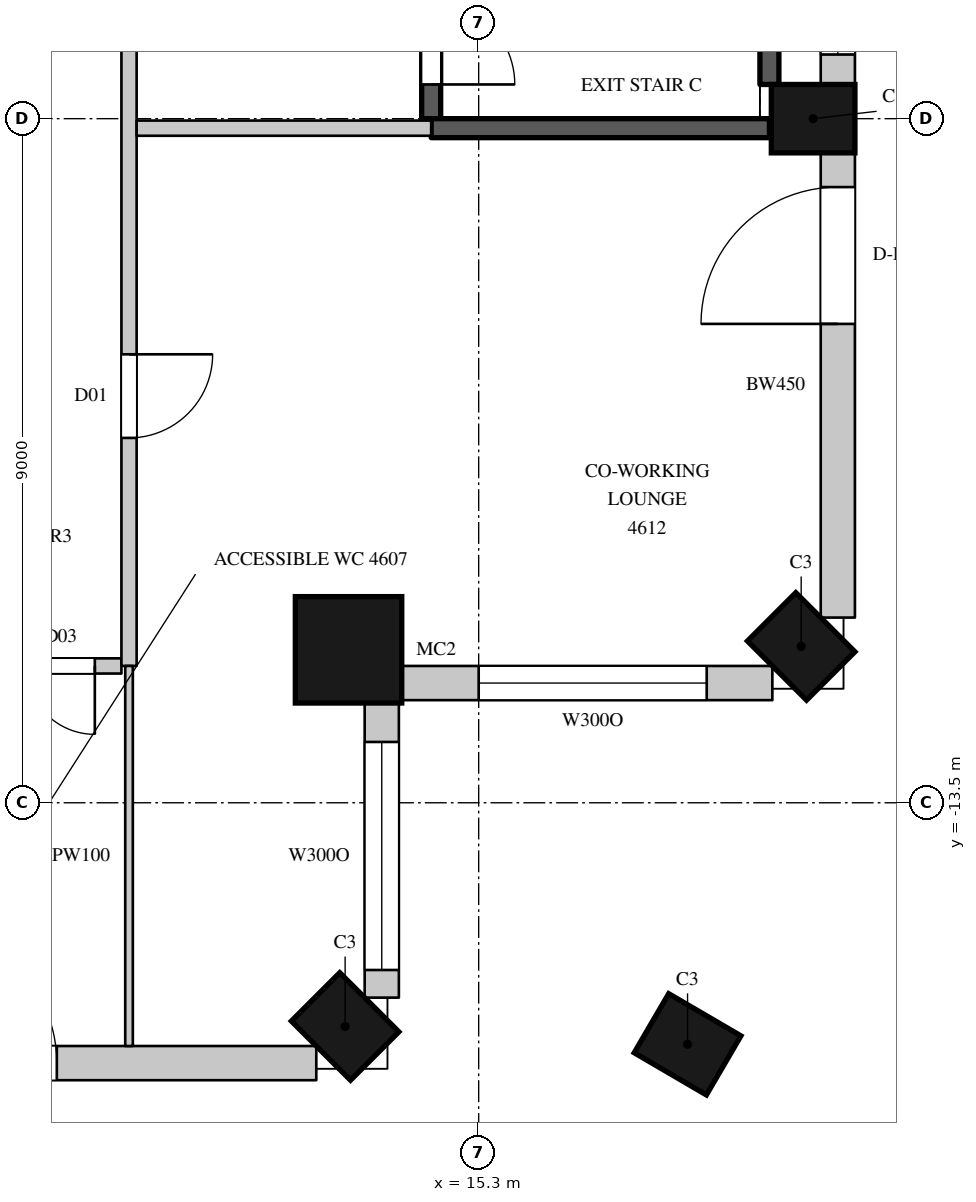
"""IFC4 building model, lengths in metres.
Left out: names, types, materials, properties, quantities, classifications, styles, units other than length and angle.
Written with IfcOpenShell. Run it as: python <this file> out.ifc"""

import sys

from ifc_helpers import new_model, si_unit, direction, frame, frame_2d, origin, origin_2d, place, context, subcontext, project, spatial, rectangle, circle, extrude, element, fill, save


model = new_model("IFC4")
c1 = context("Model", 3, precision=1e-05, world=origin(), true_north=direction((0.0, 1.0)))
c2 = subcontext(c1, "Body", "Model", "MODEL_VIEW")
j1 = project(units=[si_unit("LENGTHUNIT", "METRE"), si_unit("PLANEANGLEUNIT", "RADIAN")], contexts=[c1])
p1 = place(None, origin())
s1 = spatial("IfcSite", under=j1, at=p1, CompositionType="ELEMENT")
p2 = place(p1, origin())
s2 = spatial("IfcBuilding", under=s1, at=p2, CompositionType="ELEMENT")
p3 = place(p2, frame((0.0, 0.0, 209.7)))
s3 = spatial("IfcBuildingStorey", under=s2, at=p3, CompositionType="ELEMENT", Elevation=209.7)
p4 = place(p3, frame((13.543, -16.443, 0.0), z_axis=(0.0, 0.0, 1.0), x_axis=(0.707106781187, 0.707106781187, 0.0)))
e1 = element("IfcColumn", 1, at=p4, inside=s3, PredefinedType="COLUMN", context=c2, shape_type="SweptSolid", body=[
    extrude(rectangle(XDim=0.9, YDim=1.1, at=origin_2d()), origin(), (0.0, 0.0, 1.0), 4.1),
])
p5 = place(p3, frame((13.588, -11.488, 0.0), z_axis=(0.0, 0.0, 1.0), x_axis=(1.0, 0.0, 0.0)))
e2 = element("IfcColumn", 2, at=p5, inside=s3, PredefinedType="COLUMN", context=c2, shape_type="SweptSolid", body=[
    extrude(circle(Radius=0.7, at=origin_2d()), origin(), (0.0, 0.0, 1.0), 4.1),
])
for number, where, z_axis, x_axis in (
    (3, (19.543, -11.443, 0.0), (0.0, 0.0, 1.0), (0.707, 0.707, 0.0)),
    (4, (19.7, -4.5, 0.0), (0.0, 0.0, 1.0), (0.0, 1.0, 0.0)),
    (5, (18.048, -16.677, 0.0), (0.0, 0.0, 1.0), (0.504, 0.863, 0.0)),
):
    element("IfcColumn", number, at=place(p3, frame(where, z_axis=z_axis, x_axis=x_axis)), inside=s3, PredefinedType="COLUMN", context=c2, shape_type="SweptSolid", body=[
        extrude(rectangle(XDim=0.9, YDim=1.1, at=origin_2d()), origin(), (0.0, 0.0, 1.0), 4.1),
    ])
p6 = place(p3, frame((6.75, -16.925, 0.0), z_axis=(0.0, 0.0, 1.0), x_axis=(1.0, 0.0, 0.0)))
e6 = element("IfcWall", 6, at=p6, inside=s3, PredefinedType="SOLIDWALL", context=c2, shape_type="SweptSolid", body=[
    extrude(rectangle(XDim=6.414, YDim=0.45, at=frame_2d((3.207, 0.0))), origin(), (0.0, 0.0, 1.0), 3.8),
])
p7 = place(p6, frame((1.2, 0.0, 0.0)))
e7 = element("IfcOpeningElement", 7, at=p7, cuts=e6, PredefinedType="OPENING", context=c2, shape_type="SweptSolid", body=[
    extrude(rectangle(XDim=1.8, YDim=2.4, at=frame_2d((0.9, 1.2))), frame((0.0, 0.235, 0.0), z_axis=(0.0, -1.0, 0.0), x_axis=(1.0, 0.0, 0.0)), (0.0, 0.0, 1.0), 0.47),
])
p8 = place(p3, frame((14.025, -16.064, 0.0), z_axis=(0.0, 0.0, 1.0), x_axis=(0.0, 1.0, 0.0)))
e8 = element("IfcWall", 8, at=p8, inside=s3, PredefinedType="SOLIDWALL", context=c2, shape_type="SweptSolid", body=[
    extrude(rectangle(XDim=3.909, YDim=0.45, at=frame_2d((1.955, 0.0))), origin(), (0.0, 0.0, 1.0), 3.8),
])
p9 = place(p8, frame((0.364, 0.0, 1.05)))
e9 = element("IfcOpeningElement", 9, at=p9, cuts=e8, PredefinedType="OPENING", context=c2, shape_type="SweptSolid", body=[
    extrude(rectangle(XDim=3.0, YDim=2.4, at=frame_2d((1.5, 1.2))), frame((0.0, 0.235, 0.0), z_axis=(0.0, -1.0, 0.0), x_axis=(1.0, 0.0, 0.0)), (0.0, 0.0, 1.0), 0.47),
])
p10 = place(p3, frame((14.255, -11.925, 0.0), z_axis=(0.0, 0.0, 1.0), x_axis=(1.0, 0.0, 0.0)))
e10 = element("IfcWall", 10, at=p10, inside=s3, PredefinedType="SOLIDWALL", context=c2, shape_type="SweptSolid", body=[
    extrude(rectangle(XDim=4.909, YDim=0.45, at=frame_2d((2.455, 0.0))), origin(), (0.0, 0.0, 1.0), 3.8),
])
p11 = place(p10, frame((1.045, 0.0, 1.05)))
e11 = element("IfcOpeningElement", 11, at=p11, cuts=e10, PredefinedType="OPENING", context=c2, shape_type="SweptSolid", body=[
    extrude(rectangle(XDim=3.0, YDim=2.4, at=frame_2d((1.5, 1.2))), frame((0.0, 0.235, 0.0), z_axis=(0.0, -1.0, 0.0), x_axis=(1.0, 0.0, 0.0)), (0.0, 0.0, 1.0), 0.47),
])
p12 = place(p3, frame((20.025, -11.064, 0.0), z_axis=(0.0, 0.0, 1.0), x_axis=(0.0, 1.0, 0.0)))
e12 = element("IfcWall", 12, at=p12, inside=s3, PredefinedType="SOLIDWALL", context=c2, shape_type="SweptSolid", body=[
    extrude(rectangle(XDim=6.114, YDim=0.45, at=frame_2d((3.057, 0.0))), origin(), (0.0, 0.0, 1.0), 3.8),
])
p13 = place(p12, frame((3.864, 0.0, 0.0)))
e13 = element("IfcOpeningElement", 13, at=p13, cuts=e12, PredefinedType="OPENING", context=c2, shape_type="SweptSolid", body=[
    extrude(rectangle(XDim=1.8, YDim=2.4, at=frame_2d((0.9, 1.2))), frame((0.0, 0.235, 0.0), z_axis=(0.0, -1.0, 0.0), x_axis=(1.0, 0.0, 0.0)), (0.0, 0.0, 1.0), 0.47),
])
p14 = place(p3, frame((20.025, -4.05, 0.0), z_axis=(0.0, 0.0, 1.0), x_axis=(0.0, 1.0, 0.0)))
e14 = element("IfcWall", 14, at=p14, inside=s3, PredefinedType="SOLIDWALL", context=c2, shape_type="SweptSolid", body=[
    extrude(rectangle(XDim=8.439, YDim=0.45, at=frame_2d((4.219, 0.0))), origin(), (0.0, 0.0, 1.0), 3.8),
])
p15 = place(p14, frame((0.394, 0.0, 1.05)))
e15 = element("IfcOpeningElement", 15, at=p15, cuts=e14, PredefinedType="OPENING", context=c2, shape_type="SweptSolid", body=[
    extrude(rectangle(XDim=3.0, YDim=2.4, at=frame_2d((1.5, 1.2))), frame((0.0, 0.235, 0.0), z_axis=(0.0, -1.0, 0.0), x_axis=(1.0, 0.0, 0.0)), (0.0, 0.0, 1.0), 0.47),
])
p16 = place(p14, frame((5.082, 0.0, 1.05)))
e16 = element("IfcOpeningElement", 16, at=p16, cuts=e14, PredefinedType="OPENING", context=c2, shape_type="SweptSolid", body=[
    extrude(rectangle(XDim=3.0, YDim=2.4, at=frame_2d((1.5, 1.2))), frame((0.0, 0.235, 0.0), z_axis=(0.0, -1.0, 0.0), x_axis=(1.0, 0.0, 0.0)), (0.0, 0.0, 1.0), 0.47),
])
p17 = place(p3, frame((-10.9, -11.7, 0.0), z_axis=(0.0, 0.0, 1.0), x_axis=(1.0, 0.0, 0.0)))
e17 = element("IfcWall", 17, at=p17, inside=s3, PredefinedType="PARTITIONING", context=c2, shape_type="SweptSolid", body=[
    extrude(rectangle(XDim=21.5, YDim=0.2, at=frame_2d((10.75, 0.0))), origin(), (0.0, 0.0, 1.0), 3.8),
])
p18 = place(p17, frame((13.2, 0.0, 0.0)))
e18 = element("IfcOpeningElement", 18, at=p18, cuts=e17, PredefinedType="OPENING", context=c2, shape_type="SweptSolid", body=[
    extrude(rectangle(XDim=0.9, YDim=2.2, at=frame_2d((0.45, 1.1))), frame((0.0, 0.11, 0.0), z_axis=(0.0, -1.0, 0.0), x_axis=(1.0, 0.0, 0.0)), (0.0, 0.0, 1.0), 0.22),
])
p19 = place(p17, frame((16.5, 0.0, 0.0)))
e19 = element("IfcOpeningElement", 19, at=p19, cuts=e17, PredefinedType="OPENING", context=c2, shape_type="SweptSolid", body=[
    extrude(rectangle(XDim=0.9, YDim=2.2, at=frame_2d((0.45, 1.1))), frame((0.0, 0.11, 0.0), z_axis=(0.0, -1.0, 0.0), x_axis=(1.0, 0.0, 0.0)), (0.0, 0.0, 1.0), 0.22),
])
p20 = place(p17, frame((20.25, 0.0, 0.0)))
e20 = element("IfcOpeningElement", 20, at=p20, cuts=e17, PredefinedType="OPENING", context=c2, shape_type="SweptSolid", body=[
    extrude(rectangle(XDim=0.9, YDim=2.2, at=frame_2d((0.45, 1.1))), frame((0.0, 0.11, 0.0), z_axis=(0.0, -1.0, 0.0), x_axis=(1.0, 0.0, 0.0)), (0.0, 0.0, 1.0), 0.22),
])
p21 = place(p17, frame((1.25, 0.0, 0.0)))
e21 = element("IfcOpeningElement", 21, at=p21, cuts=e17, PredefinedType="OPENING", context=c2, shape_type="SweptSolid", body=[
    extrude(rectangle(XDim=1.1, YDim=2.4, at=frame_2d((0.55, 1.2))), frame((0.0, 0.11, 0.0), z_axis=(0.0, -1.0, 0.0), x_axis=(1.0, 0.0, 0.0)), (0.0, 0.0, 1.0), 0.22),
])
p22 = place(p17, frame((7.3, 0.0, 0.0)))
e22 = element("IfcOpeningElement", 22, at=p22, cuts=e17, PredefinedType="OPENING", context=c2, shape_type="SweptSolid", body=[
    extrude(rectangle(XDim=1.1, YDim=2.4, at=frame_2d((0.55, 1.2))), frame((0.0, 0.11, 0.0), z_axis=(0.0, -1.0, 0.0), x_axis=(1.0, 0.0, 0.0)), (0.0, 0.0, 1.0), 0.22),
])
p23 = place(p3, frame((10.7, -11.7, 0.0), z_axis=(0.0, 0.0, 1.0), x_axis=(0.0, 1.0, 0.0)))
e23 = element("IfcWall", 23, at=p23, inside=s3, PredefinedType="PARTITIONING", context=c2, shape_type="SweptSolid", body=[
    extrude(rectangle(XDim=16.345, YDim=0.2, at=frame_2d((8.172, 0.0))), origin(), (0.0, 0.0, 1.0), 3.8),
])
p24 = place(p23, frame((12.35, 0.0, 0.0)))
e24 = element("IfcOpeningElement", 24, at=p24, cuts=e23, PredefinedType="OPENING", context=c2, shape_type="SweptSolid", body=[
    extrude(rectangle(XDim=1.5, YDim=2.4, at=frame_2d((0.75, 1.2))), frame((0.0, 0.11, 0.0), z_axis=(0.0, -1.0, 0.0), x_axis=(1.0, 0.0, 0.0)), (0.0, 0.0, 1.0), 0.22),
])
p25 = place(p23, frame((3.0, 0.0, 0.0)))
e25 = element("IfcOpeningElement", 25, at=p25, cuts=e23, PredefinedType="OPENING", context=c2, shape_type="SweptSolid", body=[
    extrude(rectangle(XDim=1.1, YDim=2.4, at=frame_2d((0.55, 1.2))), frame((0.0, 0.11, 0.0), z_axis=(0.0, -1.0, 0.0), x_axis=(1.0, 0.0, 0.0)), (0.0, 0.0, 1.0), 0.22),
])
p26 = place(p3, frame((10.8, -4.625, 0.0), z_axis=(0.0, 0.0, 1.0), x_axis=(1.0, 0.0, 0.0)))
e26 = element("IfcWall", 26, at=p26, inside=s3, PredefinedType="PARTITIONING", context=c2, shape_type="SweptSolid", body=[
    extrude(rectangle(XDim=3.875, YDim=0.2, at=frame_2d((1.938, 0.0))), origin(), (0.0, 0.0, 1.0), 3.8),
])
p27 = place(p3, frame((14.675, -4.5, 0.0), z_axis=(0.0, 0.0, 1.0), x_axis=(0.0, 1.0, 0.0)))
e27 = element("IfcWall", 27, at=p27, inside=s3, PredefinedType="SHEAR", context=c2, shape_type="SweptSolid", body=[
    extrude(rectangle(XDim=9.0, YDim=0.25, at=frame_2d((4.5, 0.0))), origin(), (0.0, 0.0, 1.0), 3.8),
])
p28 = place(p27, frame((0.45, 0.0, 0.0)))
e28 = element("IfcOpeningElement", 28, at=p28, cuts=e27, PredefinedType="OPENING", context=c2, shape_type="SweptSolid", body=[
    extrude(rectangle(XDim=1.1, YDim=2.2, at=frame_2d((0.55, 1.1))), frame((0.0, 0.135, 0.0), z_axis=(0.0, -1.0, 0.0), x_axis=(1.0, 0.0, 0.0)), (0.0, 0.0, 1.0), 0.27),
])
p29 = place(p3, frame((14.675, -4.625, 0.0), z_axis=(0.0, 0.0, 1.0), x_axis=(1.0, 0.0, 0.0)))
e29 = element("IfcWall", 29, at=p29, inside=s3, PredefinedType="SHEAR", context=c2, shape_type="SweptSolid", body=[
    extrude(rectangle(XDim=4.45, YDim=0.25, at=frame_2d((2.225, 0.0))), origin(), (0.0, 0.0, 1.0), 3.8),
])
p30 = place(p3, frame((19.125, -4.05, 0.0), z_axis=(0.0, 0.0, 1.0), x_axis=(0.0, 1.0, 0.0)))
e30 = element("IfcWall", 30, at=p30, inside=s3, PredefinedType="SHEAR", context=c2, shape_type="SweptSolid", body=[
    extrude(rectangle(XDim=8.477, YDim=0.25, at=frame_2d((4.238, 0.0))), origin(), (0.0, 0.0, 1.0), 3.8),
])
p31 = place(p3, frame((10.7, -16.7, 0.0), z_axis=(0.0, 0.0, 1.0), x_axis=(0.0, 1.0, 0.0)))
e31 = element("IfcWall", 31, at=p31, inside=s3, PredefinedType="PARTITIONING", context=c2, shape_type="SweptSolid", body=[
    extrude(rectangle(XDim=5.0, YDim=0.1, at=frame_2d((2.5, 0.0))), origin(), (0.0, 0.0, 1.0), 3.8),
])
p32 = place(p7, origin())
e32 = element("IfcDoor", 32, at=p32, inside=s3, OperationType="SLIDING_TO_LEFT", PredefinedType="DOOR", context=c2, shape_type="SweptSolid", body=[
    extrude(rectangle(XDim=1.8, YDim=2.4, at=frame_2d((0.9, 1.2))), frame((0.0, 0.13, 0.0), z_axis=(0.0, -1.0, 0.0), x_axis=(1.0, 0.0, 0.0)), (0.0, 0.0, 1.0), 0.05),
])
fill(e7, e32)
p33 = place(p9, origin())
e33 = element("IfcWindow", 33, at=p33, inside=s3, PartitioningType="SINGLE_PANEL", PredefinedType="WINDOW", context=c2, shape_type="SweptSolid", body=[
    extrude(rectangle(XDim=3.0, YDim=2.4, at=frame_2d((1.5, 1.2))), frame((0.0, 0.135, 0.0), z_axis=(0.0, -1.0, 0.0), x_axis=(1.0, 0.0, 0.0)), (0.0, 0.0, 1.0), 0.06),
])
fill(e9, e33)
p34 = place(p11, origin())
e34 = element("IfcWindow", 34, at=p34, inside=s3, PartitioningType="SINGLE_PANEL", PredefinedType="WINDOW", context=c2, shape_type="SweptSolid", body=[
    extrude(rectangle(XDim=3.0, YDim=2.4, at=frame_2d((1.5, 1.2))), frame((0.0, 0.135, 0.0), z_axis=(0.0, -1.0, 0.0), x_axis=(1.0, 0.0, 0.0)), (0.0, 0.0, 1.0), 0.06),
])
fill(e11, e34)
p35 = place(p13, origin())
e35 = element("IfcDoor", 35, at=p35, inside=s3, OperationType="SLIDING_TO_LEFT", PredefinedType="DOOR", context=c2, shape_type="SweptSolid", body=[
    extrude(rectangle(XDim=1.8, YDim=2.4, at=frame_2d((0.9, 1.2))), frame((0.0, 0.13, 0.0), z_axis=(0.0, -1.0, 0.0), x_axis=(1.0, 0.0, 0.0)), (0.0, 0.0, 1.0), 0.05),
])
fill(e13, e35)
p36 = place(p15, origin())
e36 = element("IfcWindow", 36, at=p36, inside=s3, PartitioningType="SINGLE_PANEL", PredefinedType="WINDOW", context=c2, shape_type="SweptSolid", body=[
    extrude(rectangle(XDim=3.0, YDim=2.4, at=frame_2d((1.5, 1.2))), frame((0.0, 0.135, 0.0), z_axis=(0.0, -1.0, 0.0), x_axis=(1.0, 0.0, 0.0)), (0.0, 0.0, 1.0), 0.06),
])
fill(e15, e36)
p37 = place(p20, origin())
e37 = element("IfcDoor", 37, at=p37, inside=s3, OperationType="SINGLE_SWING_LEFT", PredefinedType="DOOR", context=c2, shape_type="SweptSolid", body=[
    extrude(rectangle(XDim=0.9, YDim=2.2, at=frame_2d((0.45, 1.1))), frame((0.0, 0.025, 0.0), z_axis=(0.0, -1.0, 0.0), x_axis=(1.0, 0.0, 0.0)), (0.0, 0.0, 1.0), 0.05),
])
fill(e20, e37)
p38 = place(p25, origin())
e38 = element("IfcDoor", 38, at=p38, inside=s3, OperationType="SINGLE_SWING_LEFT", PredefinedType="DOOR", context=c2, shape_type="SweptSolid", body=[
    extrude(rectangle(XDim=1.1, YDim=2.4, at=frame_2d((0.55, 1.2))), frame((0.0, 0.025, 0.0), z_axis=(0.0, -1.0, 0.0), x_axis=(1.0, 0.0, 0.0)), (0.0, 0.0, 1.0), 0.05),
])
fill(e25, e38)
p39 = place(p28, origin())
e39 = element("IfcDoor", 39, at=p39, inside=s3, OperationType="SINGLE_SWING_RIGHT", PredefinedType="DOOR", context=c2, shape_type="SweptSolid", body=[
    extrude(rectangle(XDim=1.1, YDim=2.2, at=frame_2d((0.55, 1.1))), frame((0.0, 0.025, 0.0), z_axis=(0.0, -1.0, 0.0), x_axis=(1.0, 0.0, 0.0)), (0.0, 0.0, 1.0), 0.05),
])
fill(e28, e39)
save(model, sys.argv[1])
